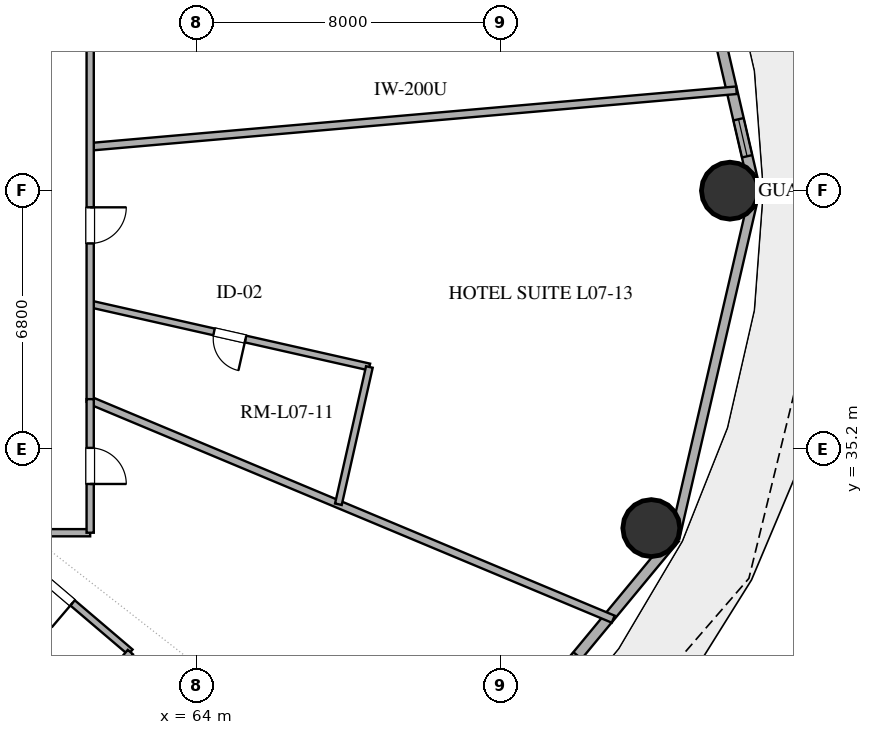
"""IFC4 building model, lengths in metres.
Left out: names, types, materials, properties, quantities, classifications, styles, units other than length and angle.
Written with IfcOpenShell. Run it as: python <this file> out.ifc"""

import sys

from ifc_helpers import new_model, si_unit, direction, frame, frame_2d, origin, origin_2d, place, context, subcontext, project, spatial, rectangle, hollow_circle, extrude, element, fill, save


model = new_model("IFC4")
c1 = context("Model", 3, precision=1e-05, world=origin(), true_north=direction((0.0, 1.0)))
c2 = subcontext(c1, "Body", "Model", "MODEL_VIEW")
j1 = project(units=[si_unit("LENGTHUNIT", "METRE"), si_unit("PLANEANGLEUNIT", "RADIAN")], contexts=[c1])
p1 = place(None, origin())
s1 = spatial("IfcSite", under=j1, at=p1, CompositionType="ELEMENT")
p2 = place(p1, origin())
s2 = spatial("IfcBuilding", under=s1, at=p2, CompositionType="ELEMENT")
p3 = place(p2, frame((0.0, 0.0, 35.4)))
s3 = spatial("IfcBuildingStorey", under=s2, at=p3, CompositionType="ELEMENT", Elevation=35.4)
for number, where, z_axis, x_axis in (
    (1, (78.035, 42.0, 0.0), (0.0, 0.0, 1.0), (1.0, 0.0, 0.0)),
    (2, (75.966, 33.122, 0.0), (0.0, 0.0, 1.0), (1.0, 0.0, 0.0)),
):
    element("IfcColumn", number, at=place(p3, frame(where, z_axis=z_axis, x_axis=x_axis)), inside=s3, PredefinedType="COLUMN", context=c2, shape_type="SweptSolid", body=[
        extrude(hollow_circle(Radius=0.75, WallThickness=0.04, at=origin_2d()), origin(), (0.0, 0.0, 1.0), 3.38),
    ])
p4 = place(p3, frame((78.696, 42.0, 0.0), z_axis=(0.0, 0.0, 1.0), x_axis=(-0.225454452941, 0.974253709076, 0.0)))
e3 = element("IfcWall", 3, at=p4, inside=s3, PredefinedType="SOLIDWALL", context=c2, shape_type="SweptSolid", body=[
    extrude(rectangle(XDim=9.38, YDim=0.28, at=frame_2d((4.69, 0.0))), origin(), (0.0, 0.0, 1.0), 3.38),
])
p5 = place(p4, frame((6.785, 0.0, 0.0)))
e4 = element("IfcOpeningElement", 4, at=p5, cuts=e3, PredefinedType="OPENING", context=c2, shape_type="SweptSolid", body=[
    extrude(rectangle(XDim=1.05, YDim=2.2, at=frame_2d((0.525, 1.1))), frame((0.0, 0.15, 0.0), z_axis=(0.0, -1.0, 0.0), x_axis=(1.0, 0.0, 0.0)), (0.0, 0.0, 1.0), 0.3),
])
p6 = place(p4, frame((0.929, 0.0, 0.85)))
e5 = element("IfcOpeningElement", 5, at=p6, cuts=e3, PredefinedType="OPENING", context=c2, shape_type="SweptSolid", body=[
    extrude(rectangle(XDim=1.0, YDim=1.8, at=frame_2d((0.5, 0.9))), frame((0.0, 0.15, 0.0), z_axis=(0.0, -1.0, 0.0), x_axis=(1.0, 0.0, 0.0)), (0.0, 0.0, 1.0), 0.3),
])
p7 = place(p3, frame((70.174, 25.114, 0.0), z_axis=(0.0, 0.0, 1.0), x_axis=(0.637296809613, 0.770618437657, 0.0)))
e6 = element("IfcWall", 6, at=p7, inside=s3, PredefinedType="SOLIDWALL", context=c2, shape_type="SweptSolid", body=[
    extrude(rectangle(XDim=10.053, YDim=0.28, at=frame_2d((5.027, 0.0))), origin(), (0.0, 0.0, 1.0), 3.38),
])
p8 = place(p7, frame((2.553, 0.0, 0.85)))
e7 = element("IfcOpeningElement", 7, at=p8, cuts=e6, PredefinedType="OPENING", context=c2, shape_type="SweptSolid", body=[
    extrude(rectangle(XDim=1.2, YDim=1.8, at=frame_2d((0.6, 0.9))), frame((0.0, 0.15, 0.0), z_axis=(0.0, -1.0, 0.0), x_axis=(1.0, 0.0, 0.0)), (0.0, 0.0, 1.0), 0.3),
])
p9 = place(p7, frame((4.839, 0.0, 0.85)))
e8 = element("IfcOpeningElement", 8, at=p9, cuts=e6, PredefinedType="OPENING", context=c2, shape_type="SweptSolid", body=[
    extrude(rectangle(XDim=1.2, YDim=1.8, at=frame_2d((0.6, 0.9))), frame((0.0, 0.15, 0.0), z_axis=(0.0, -1.0, 0.0), x_axis=(1.0, 0.0, 0.0)), (0.0, 0.0, 1.0), 0.3),
])
p10 = place(p3, frame((76.581, 32.862, 0.0), z_axis=(0.0, 0.0, 1.0), x_axis=(0.225454452941, 0.974253709076, 0.0)))
e9 = element("IfcWall", 9, at=p10, inside=s3, PredefinedType="SOLIDWALL", context=c2, shape_type="SweptSolid", body=[
    extrude(rectangle(XDim=9.38, YDim=0.25, at=frame_2d((4.69, 0.0))), origin(), (0.0, 0.0, 1.0), 3.38),
])
p11 = place(p3, frame((61.2, 43.155, 0.0), z_axis=(0.0, 0.0, 1.0), x_axis=(0.996194943742, 0.087152934912, 0.0)))
e10 = element("IfcWall", 10, at=p11, inside=s3, PredefinedType="PARTITIONING", context=c2, shape_type="SweptSolid", body=[
    extrude(rectangle(XDim=17.071, YDim=0.2, at=frame_2d((8.536, 0.0))), origin(), (0.0, 0.0, 1.0), 2.74),
])
p12 = place(p3, frame((61.2, 36.48, 0.0), z_axis=(0.0, 0.0, 1.0), x_axis=(0.922585702004, -0.385792201136, 0.0)))
e11 = element("IfcWall", 11, at=p12, inside=s3, PredefinedType="PARTITIONING", context=c2, shape_type="SweptSolid", body=[
    extrude(rectangle(XDim=14.918, YDim=0.2, at=frame_2d((7.459, 0.0))), origin(), (0.0, 0.0, 1.0), 2.74),
])
p13 = place(p3, frame((68.547, 37.361, 0.0), z_axis=(0.0, 0.0, 1.0), x_axis=(-0.975442349969, 0.220254902072, 0.0)))
e12 = element("IfcWall", 12, at=p13, inside=s3, PredefinedType="PLUMBINGWALL", context=c2, shape_type="SweptSolid", body=[
    extrude(rectangle(XDim=7.532, YDim=0.18, at=frame_2d((3.766, 0.0))), origin(), (0.0, 0.0, 1.0), 2.74),
])
p14 = place(p13, frame((3.341, 0.0, 0.0)))
e13 = element("IfcOpeningElement", 13, at=p14, cuts=e12, PredefinedType="OPENING", context=c2, shape_type="SweptSolid", body=[
    extrude(rectangle(XDim=0.85, YDim=2.1, at=frame_2d((0.425, 1.05))), frame((0.0, 0.1, 0.0), z_axis=(0.0, -1.0, 0.0), x_axis=(1.0, 0.0, 0.0)), (0.0, 0.0, 1.0), 0.2),
])
p15 = place(p3, frame((61.2, 51.0, 0.0), z_axis=(0.0, 0.0, 1.0), x_axis=(0.0, -1.0, 0.0)))
e14 = element("IfcWall", 14, at=p15, inside=s3, PredefinedType="PARTITIONING", context=c2, shape_type="SweptSolid", body=[
    extrude(rectangle(XDim=14.554, YDim=0.19, at=frame_2d((7.277, 0.0))), origin(), (0.0, 0.0, 1.0), 2.74),
])
p16 = place(p15, frame((3.684, 0.0, 0.0)))
e15 = element("IfcOpeningElement", 15, at=p16, cuts=e14, PredefinedType="OPENING", context=c2, shape_type="SweptSolid", body=[
    extrude(rectangle(XDim=1.0, YDim=2.2, at=frame_2d((0.5, 1.1))), frame((0.0, 0.105, 0.0), z_axis=(0.0, -1.0, 0.0), x_axis=(1.0, 0.0, 0.0)), (0.0, 0.0, 1.0), 0.21),
])
p17 = place(p15, frame((9.438, 0.0, 0.0)))
e16 = element("IfcOpeningElement", 16, at=p17, cuts=e14, PredefinedType="OPENING", context=c2, shape_type="SweptSolid", body=[
    extrude(rectangle(XDim=0.95, YDim=2.15, at=frame_2d((0.475, 1.075))), frame((0.0, 0.105, 0.0), z_axis=(0.0, -1.0, 0.0), x_axis=(1.0, 0.0, 0.0)), (0.0, 0.0, 1.0), 0.21),
])
p18 = place(p3, frame((55.449, 33.0, 0.0), z_axis=(0.0, 0.0, 1.0), x_axis=(0.637638501905, -0.770335732579, 0.0)))
e17 = element("IfcWall", 17, at=p18, inside=s3, PredefinedType="PARTITIONING", context=c2, shape_type="SweptSolid", body=[
    extrude(rectangle(XDim=14.187, YDim=0.2, at=frame_2d((7.094, 0.0))), origin(), (0.0, 0.0, 1.0), 2.74),
])
p19 = place(p3, frame((62.258, 29.859, 0.0), z_axis=(0.0, 0.0, 1.0), x_axis=(-0.761358380859, 0.648331254758, 0.0)))
e18 = element("IfcWall", 18, at=p19, inside=s3, PredefinedType="PLUMBINGWALL", context=c2, shape_type="SweptSolid", body=[
    extrude(rectangle(XDim=4.845, YDim=0.18, at=frame_2d((2.422, 0.0))), origin(), (0.0, 0.0, 1.0), 2.74),
])
p20 = place(p19, frame((1.997, 0.0, 0.0)))
e19 = element("IfcOpeningElement", 19, at=p20, cuts=e18, PredefinedType="OPENING", context=c2, shape_type="SweptSolid", body=[
    extrude(rectangle(XDim=0.85, YDim=2.1, at=frame_2d((0.425, 1.05))), frame((0.0, 0.1, 0.0), z_axis=(0.0, -1.0, 0.0), x_axis=(1.0, 0.0, 0.0)), (0.0, 0.0, 1.0), 0.2),
])
p21 = place(p3, frame((61.2, 33.0, 0.0), z_axis=(0.0, 0.0, 1.0), x_axis=(-1.0, 0.0, 0.0)))
e20 = element("IfcWall", 20, at=p21, inside=s3, PredefinedType="PARTITIONING", context=c2, shape_type="SweptSolid", body=[
    extrude(rectangle(XDim=11.3, YDim=0.19, at=frame_2d((5.65, 0.0))), origin(), (0.0, 0.0, 1.0), 2.74),
])
p22 = place(p21, frame((7.188, 0.0, 0.0)))
e21 = element("IfcOpeningElement", 21, at=p22, cuts=e20, PredefinedType="OPENING", context=c2, shape_type="SweptSolid", body=[
    extrude(rectangle(XDim=0.95, YDim=2.15, at=frame_2d((0.475, 1.075))), frame((0.0, 0.105, 0.0), z_axis=(0.0, -1.0, 0.0), x_axis=(1.0, 0.0, 0.0)), (0.0, 0.0, 1.0), 0.21),
])
p23 = place(p3, frame((67.731, 33.749, 0.0), z_axis=(0.0, 0.0, 1.0), x_axis=(0.220238608567, 0.9754460289, 0.0)))
e22 = element("IfcWall", 22, at=p23, inside=s3, PredefinedType="PLUMBINGWALL", context=c2, shape_type="SweptSolid", body=[
    extrude(rectangle(XDim=3.702, YDim=0.18, at=frame_2d((1.851, 0.0))), origin(), (0.0, 0.0, 1.0), 2.74),
])
p24 = place(p3, frame((61.2, 36.515, 0.0), z_axis=(0.0, 0.0, 1.0), x_axis=(0.0, -1.0, 0.0)))
e23 = element("IfcWall", 23, at=p24, inside=s3, PredefinedType="PARTITIONING", context=c2, shape_type="SweptSolid", body=[
    extrude(rectangle(XDim=3.515, YDim=0.19, at=frame_2d((1.758, 0.0))), origin(), (0.0, 0.0, 1.0), 2.74),
])
p25 = place(p24, frame((1.282, 0.0, 0.0)))
e24 = element("IfcOpeningElement", 24, at=p25, cuts=e23, PredefinedType="OPENING", context=c2, shape_type="SweptSolid", body=[
    extrude(rectangle(XDim=0.95, YDim=2.15, at=frame_2d((0.475, 1.075))), frame((0.0, 0.105, 0.0), z_axis=(0.0, -1.0, 0.0), x_axis=(1.0, 0.0, 0.0)), (0.0, 0.0, 1.0), 0.21),
])
p26 = place(p3, frame((60.124, 27.353, 0.0), z_axis=(0.0, 0.0, 1.0), x_axis=(0.648326357453, 0.76136255111, 0.0)))
e25 = element("IfcWall", 25, at=p26, inside=s3, PredefinedType="PLUMBINGWALL", context=c2, shape_type="SweptSolid", body=[
    extrude(rectangle(XDim=3.292, YDim=0.18, at=frame_2d((1.646, 0.0))), origin(), (0.0, 0.0, 1.0), 2.74),
])
p27 = place(p9, origin())
e26 = element("IfcWindow", 26, at=p27, inside=s3, PartitioningType="SINGLE_PANEL", PredefinedType="WINDOW", context=c2, shape_type="SweptSolid", body=[
    extrude(rectangle(XDim=1.2, YDim=1.8, at=frame_2d((0.6, 0.9))), frame((0.0, 0.03, 0.0), z_axis=(0.0, -1.0, 0.0), x_axis=(1.0, 0.0, 0.0)), (0.0, 0.0, 1.0), 0.06),
])
fill(e8, e26)
p28 = place(p6, origin())
e27 = element("IfcWindow", 27, at=p28, inside=s3, PartitioningType="SINGLE_PANEL", PredefinedType="WINDOW", context=c2, shape_type="SweptSolid", body=[
    extrude(rectangle(XDim=1.0, YDim=1.8, at=frame_2d((0.5, 0.9))), frame((0.0, 0.03, 0.0), z_axis=(0.0, -1.0, 0.0), x_axis=(1.0, 0.0, 0.0)), (0.0, 0.0, 1.0), 0.06),
])
fill(e5, e27)
p29 = place(p14, origin())
e28 = element("IfcDoor", 28, at=p29, inside=s3, OperationType="SINGLE_SWING_LEFT", PredefinedType="DOOR", context=c2, shape_type="SweptSolid", body=[
    extrude(rectangle(XDim=0.85, YDim=2.1, at=frame_2d((0.425, 1.05))), frame((0.0, 0.025, 0.0), z_axis=(0.0, -1.0, 0.0), x_axis=(1.0, 0.0, 0.0)), (0.0, 0.0, 1.0), 0.05),
])
fill(e13, e28)
p30 = place(p17, origin())
e29 = element("IfcDoor", 29, at=p30, inside=s3, OperationType="SINGLE_SWING_LEFT", PredefinedType="DOOR", context=c2, shape_type="SweptSolid", body=[
    extrude(rectangle(XDim=0.95, YDim=2.15, at=frame_2d((0.475, 1.075))), frame((0.0, 0.025, 0.0), z_axis=(0.0, -1.0, 0.0), x_axis=(1.0, 0.0, 0.0)), (0.0, 0.0, 1.0), 0.05),
])
fill(e16, e29)
p31 = place(p20, origin())
e30 = element("IfcDoor", 30, at=p31, inside=s3, OperationType="SINGLE_SWING_LEFT", PredefinedType="DOOR", context=c2, shape_type="SweptSolid", body=[
    extrude(rectangle(XDim=0.85, YDim=2.1, at=frame_2d((0.425, 1.05))), frame((0.0, 0.025, 0.0), z_axis=(0.0, -1.0, 0.0), x_axis=(1.0, 0.0, 0.0)), (0.0, 0.0, 1.0), 0.05),
])
fill(e19, e30)
p32 = place(p25, origin())
e31 = element("IfcDoor", 31, at=p32, inside=s3, OperationType="SINGLE_SWING_RIGHT", PredefinedType="DOOR", context=c2, shape_type="SweptSolid", body=[
    extrude(rectangle(XDim=0.95, YDim=2.15, at=frame_2d((0.475, 1.075))), frame((0.0, 0.025, 0.0), z_axis=(0.0, -1.0, 0.0), x_axis=(1.0, 0.0, 0.0)), (0.0, 0.0, 1.0), 0.05),
])
fill(e24, e31)
save(model, sys.argv[1])
